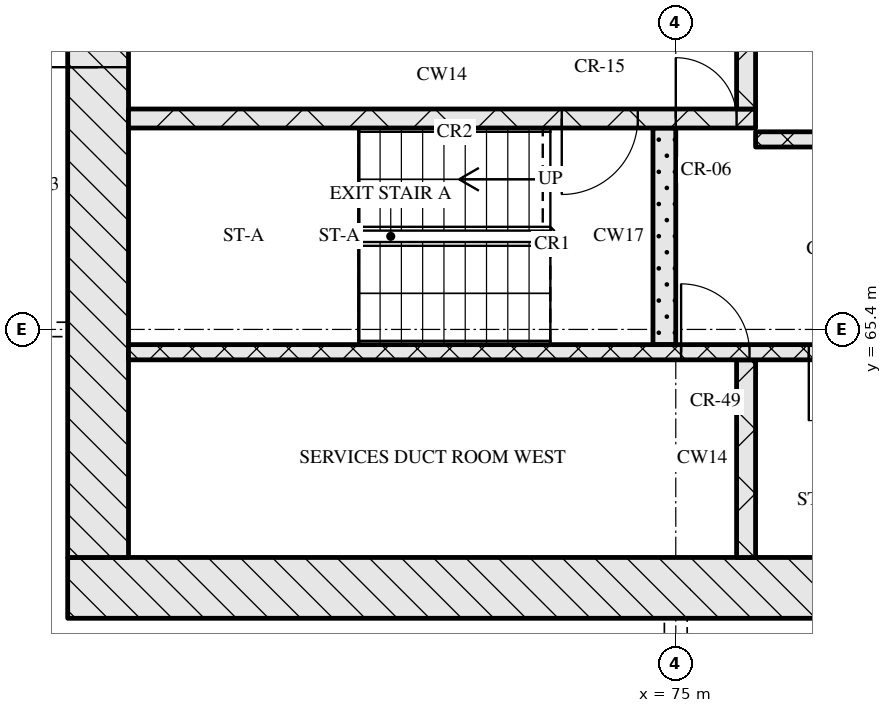
"""IFC4 building model, lengths in metres.
Left out: names, types, materials, properties, quantities, classifications, styles, units other than length and angle.
Written with IfcOpenShell. Run it as: python <this file> out.ifc"""

import sys

from ifc_helpers import new_model, si_unit, direction, frame, frame_2d, origin, place, context, subcontext, project, spatial, rectangle, extrude, element, fill, save


model = new_model("IFC4")
c1 = context("Model", 3, precision=1e-05, world=origin(), true_north=direction((0.0, 1.0)))
c2 = subcontext(c1, "Body", "Model", "MODEL_VIEW")
j1 = project(units=[si_unit("LENGTHUNIT", "METRE"), si_unit("PLANEANGLEUNIT", "RADIAN")], contexts=[c1])
p1 = place(None, origin())
s1 = spatial("IfcSite", under=j1, at=p1, CompositionType="ELEMENT")
p2 = place(p1, origin())
s2 = spatial("IfcBuilding", under=s1, at=p2, CompositionType="ELEMENT")
p3 = place(p2, frame((0.0, 0.0, 190.65)))
s3 = spatial("IfcBuildingStorey", under=s2, at=p3, CompositionType="ELEMENT", Elevation=190.65)
p4 = place(p3, frame((67.0, 62.0, 0.0), z_axis=(0.0, 0.0, 1.0), x_axis=(1.0, 0.0, 0.0)))
e1 = element("IfcWall", 1, at=p4, inside=s3, PredefinedType="SOLIDWALL", context=c2, shape_type="SweptSolid", body=[
    extrude(rectangle(XDim=41.2, YDim=0.8, at=frame_2d((20.6, 0.0))), origin(), (0.0, 0.0, 1.0), 3.3),
])
p5 = place(p4, frame((20.95, 0.0, 0.0)))
e2 = element("IfcOpeningElement", 2, at=p5, cuts=e1, PredefinedType="OPENING", context=c2, shape_type="SweptSolid", body=[
    extrude(rectangle(XDim=1.8, YDim=2.1, at=frame_2d((0.9, 1.05))), frame((0.0, 0.41, 0.0), z_axis=(0.0, -1.0, 0.0), x_axis=(1.0, 0.0, 0.0)), (0.0, 0.0, 1.0), 0.82),
])
p6 = place(p3, frame((67.4, 62.4, 0.0), z_axis=(0.0, 0.0, 1.0), x_axis=(0.0, 1.0, 0.0)))
e3 = element("IfcWall", 3, at=p6, inside=s3, PredefinedType="SOLIDWALL", context=c2, shape_type="SweptSolid", body=[
    extrude(rectangle(XDim=12.0, YDim=0.8, at=frame_2d((6.0, 0.0))), origin(), (0.0, 0.0, 1.0), 3.3),
])
p7 = place(p6, frame((6.45, 0.0, 0.0)))
e4 = element("IfcOpeningElement", 4, at=p7, cuts=e3, PredefinedType="OPENING", context=c2, shape_type="SweptSolid", body=[
    extrude(rectangle(XDim=1.2, YDim=2.1, at=frame_2d((0.6, 1.05))), frame((0.0, 0.41, 0.0), z_axis=(0.0, -1.0, 0.0), x_axis=(1.0, 0.0, 0.0)), (0.0, 0.0, 1.0), 0.82),
])
p8 = place(p3, frame((75.925, 62.4, 0.0), z_axis=(0.0, 0.0, 1.0), x_axis=(0.0, 1.0, 0.0)))
e5 = element("IfcWall", 5, at=p8, inside=s3, PredefinedType="SOLIDWALL", context=c2, shape_type="SweptSolid", body=[
    extrude(rectangle(XDim=2.6, YDim=0.25, at=frame_2d((1.3, 0.0))), origin(), (0.0, 0.0, 1.0), 3.3),
])
p9 = place(p3, frame((67.8, 65.1, 0.0), z_axis=(0.0, 0.0, 1.0), x_axis=(1.0, 0.0, 0.0)))
e6 = element("IfcWall", 6, at=p9, inside=s3, PredefinedType="SOLIDWALL", context=c2, shape_type="SweptSolid", body=[
    extrude(rectangle(XDim=18.5, YDim=0.2, at=frame_2d((9.25, 0.0))), origin(), (0.0, 0.0, 1.0), 3.3),
])
p10 = place(p9, frame((7.27, 0.0, 0.0)))
e7 = element("IfcOpeningElement", 7, at=p10, cuts=e6, PredefinedType="OPENING", context=c2, shape_type="SweptSolid", body=[
    extrude(rectangle(XDim=0.9, YDim=2.1, at=frame_2d((0.45, 1.05))), frame((0.0, 0.11, 0.0), z_axis=(0.0, -1.0, 0.0), x_axis=(1.0, 0.0, 0.0)), (0.0, 0.0, 1.0), 0.22),
])
p11 = place(p9, frame((8.95, 0.0, 0.0)))
e8 = element("IfcOpeningElement", 8, at=p11, cuts=e6, PredefinedType="OPENING", context=c2, shape_type="SweptSolid", body=[
    extrude(rectangle(XDim=0.9, YDim=2.1, at=frame_2d((0.45, 1.05))), frame((0.0, 0.11, 0.0), z_axis=(0.0, -1.0, 0.0), x_axis=(1.0, 0.0, 0.0)), (0.0, 0.0, 1.0), 0.22),
])
p12 = place(p9, frame((11.42, 0.0, 0.0)))
e9 = element("IfcOpeningElement", 9, at=p12, cuts=e6, PredefinedType="OPENING", context=c2, shape_type="SweptSolid", body=[
    extrude(rectangle(XDim=0.9, YDim=2.1, at=frame_2d((0.45, 1.05))), frame((0.0, 0.11, 0.0), z_axis=(0.0, -1.0, 0.0), x_axis=(1.0, 0.0, 0.0)), (0.0, 0.0, 1.0), 0.22),
])
p13 = place(p9, frame((13.92, 0.0, 0.0)))
e10 = element("IfcOpeningElement", 10, at=p13, cuts=e6, PredefinedType="OPENING", context=c2, shape_type="SweptSolid", body=[
    extrude(rectangle(XDim=0.9, YDim=2.1, at=frame_2d((0.45, 1.05))), frame((0.0, 0.11, 0.0), z_axis=(0.0, -1.0, 0.0), x_axis=(1.0, 0.0, 0.0)), (0.0, 0.0, 1.0), 0.22),
])
p14 = place(p9, frame((16.7, 0.0, 0.0)))
e11 = element("IfcOpeningElement", 11, at=p14, cuts=e6, PredefinedType="OPENING", context=c2, shape_type="SweptSolid", body=[
    extrude(rectangle(XDim=0.9, YDim=2.1, at=frame_2d((0.45, 1.05))), frame((0.0, 0.11, 0.0), z_axis=(0.0, -1.0, 0.0), x_axis=(1.0, 0.0, 0.0)), (0.0, 0.0, 1.0), 0.22),
])
p15 = place(p3, frame((74.85, 65.2, 0.0), z_axis=(0.0, 0.0, 1.0), x_axis=(0.0, 1.0, 0.0)))
e12 = element("IfcWall", 12, at=p15, inside=s3, PredefinedType="SOLIDWALL", context=c2, shape_type="SweptSolid", body=[
    extrude(rectangle(XDim=2.85, YDim=0.3, at=frame_2d((1.425, 0.0))), origin(), (0.0, 0.0, 1.0), 3.3),
])
p16 = place(p3, frame((76.05, 67.9, 0.0), z_axis=(0.0, 0.0, 1.0), x_axis=(1.0, 0.0, 0.0)))
e13 = element("IfcWall", 13, at=p16, inside=s3, PredefinedType="SOLIDWALL", context=c2, shape_type="SweptSolid", body=[
    extrude(rectangle(XDim=23.1, YDim=0.2, at=frame_2d((11.55, 0.0))), origin(), (0.0, 0.0, 1.0), 3.3),
])
p17 = place(p16, frame((1.95, 0.0, 0.0)))
e14 = element("IfcOpeningElement", 14, at=p17, cuts=e13, PredefinedType="OPENING", context=c2, shape_type="SweptSolid", body=[
    extrude(rectangle(XDim=0.9, YDim=2.1, at=frame_2d((0.45, 1.05))), frame((0.0, 0.11, 0.0), z_axis=(0.0, -1.0, 0.0), x_axis=(1.0, 0.0, 0.0)), (0.0, 0.0, 1.0), 0.22),
])
p18 = place(p16, frame((5.66, 0.0, 0.0)))
e15 = element("IfcOpeningElement", 15, at=p18, cuts=e13, PredefinedType="OPENING", context=c2, shape_type="SweptSolid", body=[
    extrude(rectangle(XDim=0.9, YDim=2.1, at=frame_2d((0.45, 1.05))), frame((0.0, 0.11, 0.0), z_axis=(0.0, -1.0, 0.0), x_axis=(1.0, 0.0, 0.0)), (0.0, 0.0, 1.0), 0.22),
])
p19 = place(p16, frame((9.7, 0.0, 0.0)))
e16 = element("IfcOpeningElement", 16, at=p19, cuts=e13, PredefinedType="OPENING", context=c2, shape_type="SweptSolid", body=[
    extrude(rectangle(XDim=0.9, YDim=2.1, at=frame_2d((0.45, 1.05))), frame((0.0, 0.11, 0.0), z_axis=(0.0, -1.0, 0.0), x_axis=(1.0, 0.0, 0.0)), (0.0, 0.0, 1.0), 0.22),
])
p20 = place(p16, frame((13.55, 0.0, 0.0)))
e17 = element("IfcOpeningElement", 17, at=p20, cuts=e13, PredefinedType="OPENING", context=c2, shape_type="SweptSolid", body=[
    extrude(rectangle(XDim=1.0, YDim=2.1, at=frame_2d((0.5, 1.05))), frame((0.0, 0.11, 0.0), z_axis=(0.0, -1.0, 0.0), x_axis=(1.0, 0.0, 0.0)), (0.0, 0.0, 1.0), 0.22),
])
p21 = place(p16, frame((16.2, 0.0, 0.0)))
e18 = element("IfcOpeningElement", 18, at=p21, cuts=e13, PredefinedType="OPENING", context=c2, shape_type="SweptSolid", body=[
    extrude(rectangle(XDim=1.1, YDim=2.1, at=frame_2d((0.55, 1.05))), frame((0.0, 0.11, 0.0), z_axis=(0.0, -1.0, 0.0), x_axis=(1.0, 0.0, 0.0)), (0.0, 0.0, 1.0), 0.22),
])
p22 = place(p16, frame((18.7, 0.0, 0.0)))
e19 = element("IfcOpeningElement", 19, at=p22, cuts=e13, PredefinedType="OPENING", context=c2, shape_type="SweptSolid", body=[
    extrude(rectangle(XDim=1.1, YDim=2.1, at=frame_2d((0.55, 1.05))), frame((0.0, 0.11, 0.0), z_axis=(0.0, -1.0, 0.0), x_axis=(1.0, 0.0, 0.0)), (0.0, 0.0, 1.0), 0.22),
])
p23 = place(p16, frame((21.2, 0.0, 0.0)))
e20 = element("IfcOpeningElement", 20, at=p23, cuts=e13, PredefinedType="OPENING", context=c2, shape_type="SweptSolid", body=[
    extrude(rectangle(XDim=1.1, YDim=2.1, at=frame_2d((0.55, 1.05))), frame((0.0, 0.11, 0.0), z_axis=(0.0, -1.0, 0.0), x_axis=(1.0, 0.0, 0.0)), (0.0, 0.0, 1.0), 0.22),
])
p24 = place(p3, frame((67.8, 68.175, 0.0), z_axis=(0.0, 0.0, 1.0), x_axis=(1.0, 0.0, 0.0)))
e21 = element("IfcWall", 21, at=p24, inside=s3, PredefinedType="SOLIDWALL", context=c2, shape_type="SweptSolid", body=[
    extrude(rectangle(XDim=8.25, YDim=0.25, at=frame_2d((4.125, 0.0))), origin(), (0.0, 0.0, 1.0), 3.3),
])
p25 = place(p24, frame((5.7, 0.0, 0.0)))
e22 = element("IfcOpeningElement", 22, at=p25, cuts=e21, PredefinedType="OPENING", context=c2, shape_type="SweptSolid", body=[
    extrude(rectangle(XDim=1.0, YDim=2.1, at=frame_2d((0.5, 1.05))), frame((0.0, 0.135, 0.0), z_axis=(0.0, -1.0, 0.0), x_axis=(1.0, 0.0, 0.0)), (0.0, 0.0, 1.0), 0.27),
])
p26 = place(p24, frame((7.2, 0.0, 0.0)))
e23 = element("IfcOpeningElement", 23, at=p26, cuts=e21, PredefinedType="OPENING", context=c2, shape_type="SweptSolid", body=[
    extrude(rectangle(XDim=0.8, YDim=2.1, at=frame_2d((0.4, 1.05))), frame((0.0, 0.135, 0.0), z_axis=(0.0, -1.0, 0.0), x_axis=(1.0, 0.0, 0.0)), (0.0, 0.0, 1.0), 0.27),
])
p27 = place(p3, frame((75.925, 68.3, 0.0), z_axis=(0.0, 0.0, 1.0), x_axis=(0.0, 1.0, 0.0)))
e24 = element("IfcWall", 24, at=p27, inside=s3, PredefinedType="SOLIDWALL", context=c2, shape_type="SweptSolid", body=[
    extrude(rectangle(XDim=2.3, YDim=0.25, at=frame_2d((1.15, 0.0))), origin(), (0.0, 0.0, 1.0), 3.3),
])
p28 = place(p10, origin())
e25 = element("IfcDoor", 25, at=p28, inside=s3, OperationType="SINGLE_SWING_LEFT", PredefinedType="DOOR", context=c2, shape_type="SweptSolid", body=[
    extrude(rectangle(XDim=0.9, YDim=2.1, at=frame_2d((0.45, 1.05))), frame((0.0, 0.025, 0.0), z_axis=(0.0, -1.0, 0.0), x_axis=(1.0, 0.0, 0.0)), (0.0, 0.0, 1.0), 0.05),
])
fill(e7, e25)
p29 = place(p11, origin())
e26 = element("IfcDoor", 26, at=p29, inside=s3, OperationType="SINGLE_SWING_RIGHT", PredefinedType="DOOR", context=c2, shape_type="SweptSolid", body=[
    extrude(rectangle(XDim=0.9, YDim=2.1, at=frame_2d((0.45, 1.05))), frame((0.0, 0.025, 0.0), z_axis=(0.0, -1.0, 0.0), x_axis=(1.0, 0.0, 0.0)), (0.0, 0.0, 1.0), 0.05),
])
fill(e8, e26)
p30 = place(p25, origin())
e27 = element("IfcDoor", 27, at=p30, inside=s3, OperationType="SINGLE_SWING_RIGHT", PredefinedType="DOOR", context=c2, shape_type="SweptSolid", body=[
    extrude(rectangle(XDim=1.0, YDim=2.1, at=frame_2d((0.5, 1.05))), frame((0.0, 0.025, 0.0), z_axis=(0.0, -1.0, 0.0), x_axis=(1.0, 0.0, 0.0)), (0.0, 0.0, 1.0), 0.05),
])
fill(e22, e27)
p31 = place(p26, origin())
e28 = element("IfcDoor", 28, at=p31, inside=s3, OperationType="SINGLE_SWING_LEFT", PredefinedType="DOOR", context=c2, shape_type="SweptSolid", body=[
    extrude(rectangle(XDim=0.8, YDim=2.1, at=frame_2d((0.4, 1.05))), frame((0.0, 0.025, 0.0), z_axis=(0.0, -1.0, 0.0), x_axis=(1.0, 0.0, 0.0)), (0.0, 0.0, 1.0), 0.05),
])
fill(e23, e28)
p32 = place(p7, origin())
e29 = element("IfcDoor", 29, at=p32, inside=s3, OperationType="SINGLE_SWING_LEFT", PredefinedType="DOOR", context=c2, shape_type="SweptSolid", body=[
    extrude(rectangle(XDim=1.2, YDim=2.1, at=frame_2d((0.6, 1.05))), frame((0.0, 0.025, 0.0), z_axis=(0.0, -1.0, 0.0), x_axis=(1.0, 0.0, 0.0)), (0.0, 0.0, 1.0), 0.05),
])
fill(e4, e29)
save(model, sys.argv[1])
